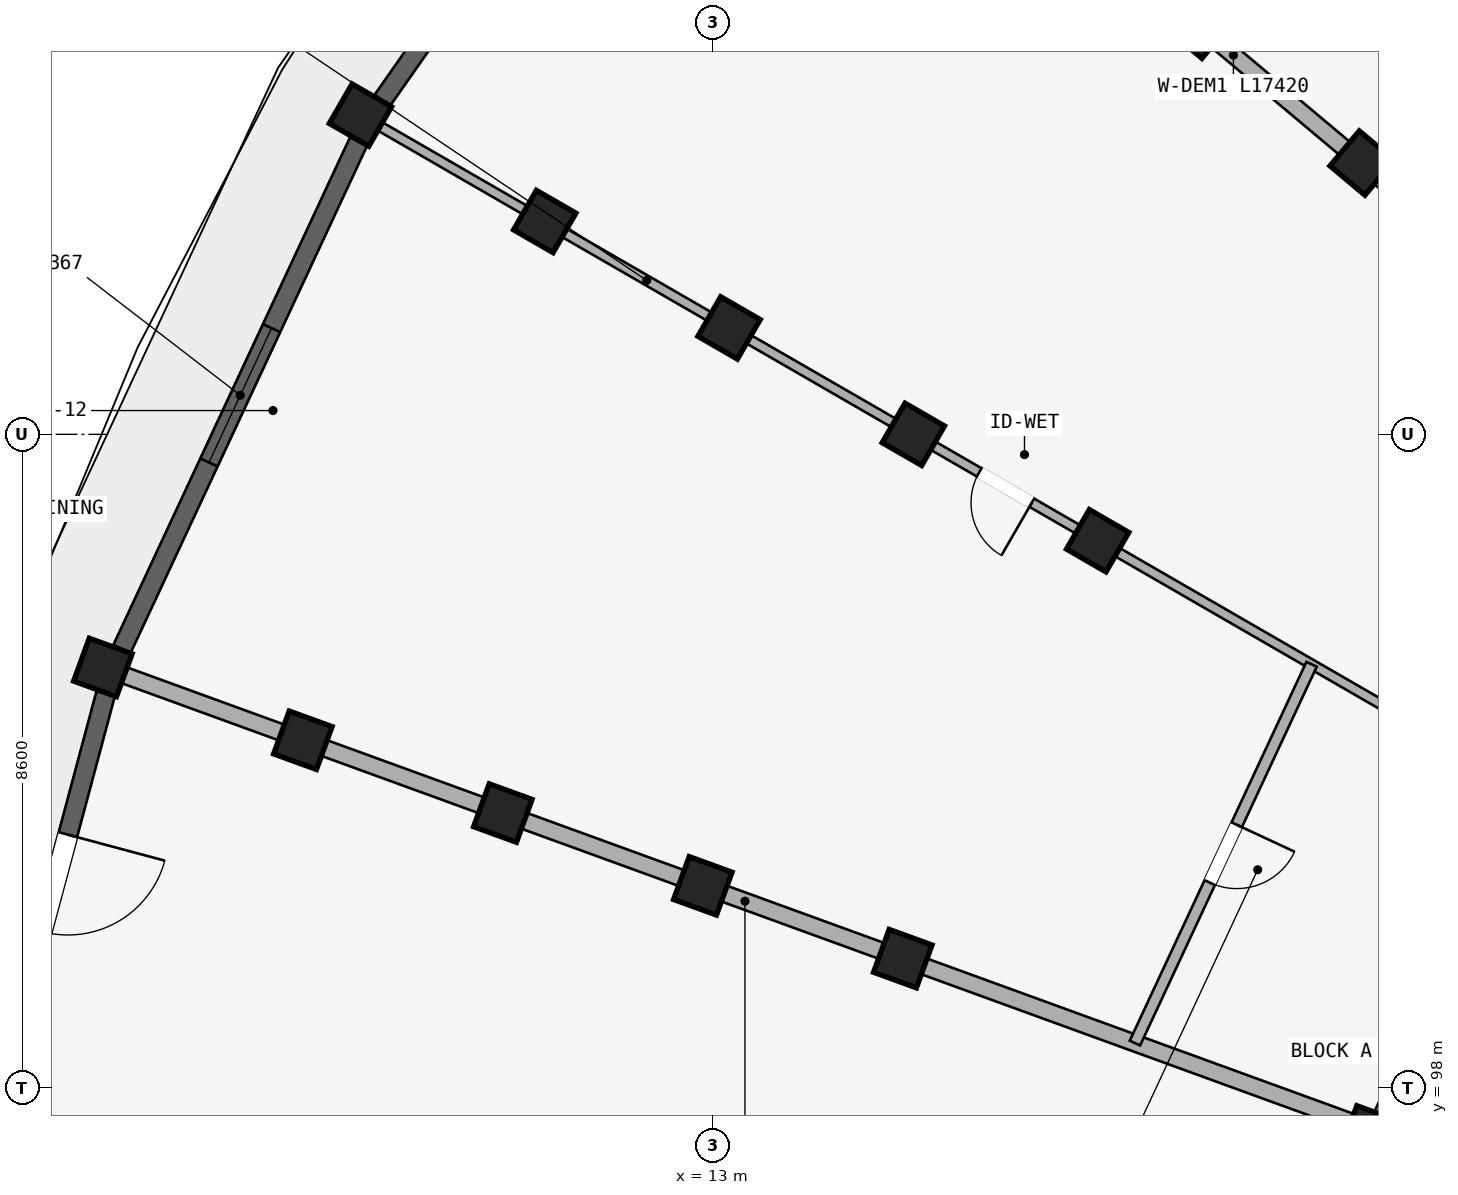
"""IFC4 building model, lengths in metres.
Left out: names, types, materials, properties, quantities, classifications, styles, units other than length and angle.
Written with IfcOpenShell. Run it as: python <this file> out.ifc"""

import sys

from ifc_helpers import new_model, si_unit, direction, frame, frame_2d, origin, origin_2d, place, context, subcontext, project, spatial, rectangle, extrude, element, fill, save


model = new_model("IFC4")
c1 = context("Model", 3, precision=1e-05, world=origin(), true_north=direction((0.0, 1.0)))
c2 = subcontext(c1, "Body", "Model", "MODEL_VIEW")
j1 = project(units=[si_unit("LENGTHUNIT", "METRE"), si_unit("PLANEANGLEUNIT", "RADIAN")], contexts=[c1])
p1 = place(None, origin())
s1 = spatial("IfcSite", under=j1, at=p1, CompositionType="ELEMENT")
p2 = place(p1, origin())
s2 = spatial("IfcBuilding", under=s1, at=p2, CompositionType="ELEMENT")
p3 = place(p2, frame((0.0, 0.0, 33.9)))
s3 = spatial("IfcBuildingStorey", under=s2, at=p3, CompositionType="ELEMENT", Elevation=33.9)
for number, where, z_axis, x_axis in (
    (1, (21.542, 110.169, 0.0), (0.0, 0.0, 1.0), (0.643, 0.766, 0.0)),
    (2, (19.397, 111.969, 0.0), (0.0, 0.0, 1.0), (0.643, 0.766, 0.0)),
    (3, (18.062, 105.2, 0.0), (0.0, 0.0, 1.0), (0.5, 0.866, 0.0)),
    (4, (15.637, 106.6, 0.0), (0.0, 0.0, 1.0), (0.5, 0.866, 0.0)),
    (5, (13.213, 108.0, 0.0), (0.0, 0.0, 1.0), (0.5, 0.866, 0.0)),
    (6, (10.788, 109.4, 0.0), (0.0, 0.0, 1.0), (0.5, 0.866, 0.0)),
    (7, (8.363, 110.8, 0.0), (0.0, 0.0, 1.0), (0.5, 0.866, 0.0)),
):
    element("IfcColumn", number, at=place(p3, frame(where, z_axis=z_axis, x_axis=x_axis)), inside=s3, PredefinedType="COLUMN", context=c2, shape_type="SweptSolid", body=[
        extrude(rectangle(XDim=0.6, YDim=0.6, at=origin_2d()), origin(), (0.0, 0.0, 1.0), 2.93),
    ])
p4 = place(p3, frame((21.701, 97.445, 0.0), z_axis=(0.0, 0.0, 1.0), x_axis=(0.342020143326, 0.939692620786, 0.0)))
e8 = element("IfcColumn", 8, at=p4, inside=s3, PredefinedType="COLUMN", context=c2, shape_type="SweptSolid", body=[
    extrude(rectangle(XDim=0.45, YDim=0.65, at=origin_2d()), origin(), (0.0, 0.0, 1.0), 2.93),
])
for number, where, z_axis, x_axis in (
    (9, (15.499, 99.702, 0.0), (0.0, 0.0, 1.0), (0.342, 0.94, 0.0)),
    (10, (12.868, 100.66, 0.0), (0.0, 0.0, 1.0), (0.342, 0.94, 0.0)),
    (11, (10.236, 101.618, 0.0), (0.0, 0.0, 1.0), (0.342, 0.94, 0.0)),
    (12, (7.605, 102.575, 0.0), (0.0, 0.0, 1.0), (0.342, 0.94, 0.0)),
    (13, (4.974, 103.533, 0.0), (0.0, 0.0, 1.0), (0.342, 0.94, 0.0)),
):
    element("IfcColumn", number, at=place(p3, frame(where, z_axis=z_axis, x_axis=x_axis)), inside=s3, PredefinedType="COLUMN", context=c2, shape_type="SweptSolid", body=[
        extrude(rectangle(XDim=0.6, YDim=0.6, at=origin_2d()), origin(), (0.0, 0.0, 1.0), 2.93),
    ])
p5 = place(p3, frame((23.778, 101.9, 0.0), z_axis=(0.0, 0.0, 1.0), x_axis=(-0.422629854778, -0.906302381024, 0.0)))
e14 = element("IfcWall", 14, at=p5, inside=s3, PredefinedType="STANDARD", context=c2, shape_type="SweptSolid", body=[
    extrude(rectangle(XDim=4.915, YDim=0.2, at=frame_2d((2.458, 0.0))), origin(), (0.0, 0.0, 1.0), 2.372),
])
p6 = place(p3, frame((30.009, 109.479, 0.0), z_axis=(0.0, 0.0, 1.0), x_axis=(-0.642784757967, 0.766046835987, 0.0)))
e15 = element("IfcWall", 15, at=p6, inside=s3, PredefinedType="PARTITIONING", context=c2, shape_type="SweptSolid", body=[
    extrude(rectangle(XDim=17.42, YDim=0.125, at=frame_2d((8.71, 0.0))), origin(), (0.0, 0.0, 1.0), 2.372),
])
p7 = place(p6, frame((7.5, 0.0, 0.0)))
e16 = element("IfcOpeningElement", 16, at=p7, cuts=e15, PredefinedType="OPENING", context=c2, shape_type="SweptSolid", body=[
    extrude(rectangle(XDim=0.8, YDim=2.1, at=frame_2d((0.4, 1.05))), frame((0.0, 0.073, 0.0), z_axis=(0.0, -1.0, 0.0), x_axis=(1.0, 0.0, 0.0)), (0.0, 0.0, 1.0), 0.145),
])
p8 = place(p3, frame((26.521, 105.991, 0.0), z_axis=(0.0, 0.0, 1.0), x_axis=(-0.766046835987, 0.642784757967, 0.0)))
e17 = element("IfcWall", 17, at=p8, inside=s3, PredefinedType="STANDARD", context=c2, shape_type="SweptSolid", body=[
    extrude(rectangle(XDim=17.42, YDim=0.22, at=frame_2d((8.71, 0.0))), origin(), (0.0, 0.0, 1.0), 2.372),
])
p9 = place(p3, frame((23.691, 101.95, 0.0), z_axis=(0.0, 0.0, 1.0), x_axis=(-0.866026648973, 0.499997843263, 0.0)))
e18 = element("IfcWall", 18, at=p9, inside=s3, PredefinedType="PARTITIONING", context=c2, shape_type="SweptSolid", body=[
    extrude(rectangle(XDim=17.42, YDim=0.125, at=frame_2d((8.71, 0.0))), origin(), (0.0, 0.0, 1.0), 2.372),
])
p10 = place(p9, frame((7.5, 0.0, 0.0)))
e19 = element("IfcOpeningElement", 19, at=p10, cuts=e18, PredefinedType="OPENING", context=c2, shape_type="SweptSolid", body=[
    extrude(rectangle(XDim=0.8, YDim=2.1, at=frame_2d((0.4, 1.05))), frame((0.0, 0.073, 0.0), z_axis=(0.0, -1.0, 0.0), x_axis=(1.0, 0.0, 0.0)), (0.0, 0.0, 1.0), 0.145),
])
p11 = place(p3, frame((21.607, 97.479, 0.0), z_axis=(0.0, 0.0, 1.0), x_axis=(-0.939691901159, 0.342022120477, 0.0)))
e20 = element("IfcWall", 20, at=p11, inside=s3, PredefinedType="STANDARD", context=c2, shape_type="SweptSolid", body=[
    extrude(rectangle(XDim=17.42, YDim=0.22, at=frame_2d((8.71, 0.0))), origin(), (0.0, 0.0, 1.0), 2.372),
])
p12 = place(p3, frame((20.877, 103.575, 0.0), z_axis=(0.0, 0.0, 1.0), x_axis=(-0.422630264446, -0.906302189986, 0.0)))
e21 = element("IfcWall", 21, at=p12, inside=s3, PredefinedType="PLUMBINGWALL", context=c2, shape_type="SweptSolid", body=[
    extrude(rectangle(XDim=5.5, YDim=0.15, at=frame_2d((2.75, 0.0))), origin(), (0.0, 0.0, 1.0), 2.372),
])
p13 = place(p12, frame((2.33, 0.0, 0.0)))
e22 = element("IfcOpeningElement", 22, at=p13, cuts=e21, PredefinedType="OPENING", context=c2, shape_type="SweptSolid", body=[
    extrude(rectangle(XDim=0.84, YDim=2.1, at=frame_2d((0.42, 1.05))), frame((0.0, 0.085, 0.0), z_axis=(0.0, -1.0, 0.0), x_axis=(1.0, 0.0, 0.0)), (0.0, 0.0, 1.0), 0.17),
])
p14 = place(p3, frame((12.878, 117.03, 0.0), z_axis=(0.0, 0.0, 1.0), x_axis=(-0.573582441919, -0.819147839112, 0.0)))
e23 = element("IfcWall", 23, at=p14, inside=s3, PredefinedType="STANDARD", context=c2, shape_type="SweptSolid", body=[
    extrude(rectangle(XDim=7.367, YDim=0.25, at=frame_2d((3.684, 0.0))), origin(), (0.0, 0.0, 1.0), 2.472),
])
p15 = place(p14, frame((2.634, 0.0, 0.472)))
e24 = element("IfcOpeningElement", 24, at=p15, cuts=e23, PredefinedType="OPENING", context=c2, shape_type="SweptSolid", body=[
    extrude(rectangle(XDim=2.1, YDim=1.8, at=frame_2d((1.05, 0.9))), frame((0.0, 0.135, 0.0), z_axis=(0.0, -1.0, 0.0), x_axis=(1.0, 0.0, 0.0)), (0.0, 0.0, 1.0), 0.27),
])
p16 = place(p3, frame((8.338, 110.452, 0.0), z_axis=(0.0, 0.0, 1.0), x_axis=(-0.422589730823, -0.906321090675, 0.0)))
e25 = element("IfcWall", 25, at=p16, inside=s3, PredefinedType="STANDARD", context=c2, shape_type="SweptSolid", body=[
    extrude(rectangle(XDim=7.367, YDim=0.25, at=frame_2d((3.684, 0.0))), origin(), (0.0, 0.0, 1.0), 2.472),
])
p17 = place(p16, frame((2.708, 0.0, 0.422)))
e26 = element("IfcOpeningElement", 26, at=p17, cuts=e25, PredefinedType="OPENING", context=c2, shape_type="SweptSolid", body=[
    extrude(rectangle(XDim=1.95, YDim=1.85, at=frame_2d((0.975, 0.925))), frame((0.0, 0.135, 0.0), z_axis=(0.0, -1.0, 0.0), x_axis=(1.0, 0.0, 0.0)), (0.0, 0.0, 1.0), 0.27),
])
p18 = place(p3, frame((5.01, 103.186, 0.0), z_axis=(0.0, 0.0, 1.0), x_axis=(-0.258821669831, -0.965925122991, 0.0)))
e27 = element("IfcWall", 27, at=p18, inside=s3, PredefinedType="STANDARD", context=c2, shape_type="SweptSolid", body=[
    extrude(rectangle(XDim=7.367, YDim=0.25, at=frame_2d((3.684, 0.0))), origin(), (0.0, 0.0, 1.0), 2.472),
])
p19 = place(p18, frame((4.84, 0.0, 0.622)))
e28 = element("IfcOpeningElement", 28, at=p19, cuts=e27, PredefinedType="OPENING", context=c2, shape_type="SweptSolid", body=[
    extrude(rectangle(XDim=1.2, YDim=1.5, at=frame_2d((0.6, 0.75))), frame((0.0, 0.135, 0.0), z_axis=(0.0, -1.0, 0.0), x_axis=(1.0, 0.0, 0.0)), (0.0, 0.0, 1.0), 0.27),
])
p20 = place(p18, frame((1.918, 0.0, 0.0)))
e29 = element("IfcOpeningElement", 29, at=p20, cuts=e27, PredefinedType="OPENING", context=c2, shape_type="SweptSolid", body=[
    extrude(rectangle(XDim=1.32, YDim=2.15, at=frame_2d((0.66, 1.075))), frame((0.0, 0.135, 0.0), z_axis=(0.0, -1.0, 0.0), x_axis=(1.0, 0.0, 0.0)), (0.0, 0.0, 1.0), 0.27),
])
p21 = place(p17, origin())
e30 = element("IfcWindow", 30, at=p21, inside=s3, PartitioningType="DOUBLE_PANEL_VERTICAL", PredefinedType="WINDOW", context=c2, shape_type="SweptSolid", body=[
    extrude(rectangle(XDim=1.95, YDim=1.85, at=frame_2d((0.975, 0.925))), frame((0.0, 0.03, 0.0), z_axis=(0.0, -1.0, 0.0), x_axis=(1.0, 0.0, 0.0)), (0.0, 0.0, 1.0), 0.06),
])
fill(e26, e30)
p22 = place(p10, origin())
e31 = element("IfcDoor", 31, at=p22, inside=s3, OperationType="SINGLE_SWING_LEFT", PredefinedType="DOOR", context=c2, shape_type="SweptSolid", body=[
    extrude(rectangle(XDim=0.8, YDim=2.1, at=frame_2d((0.4, 1.05))), frame((0.0, 0.025, 0.0), z_axis=(0.0, -1.0, 0.0), x_axis=(1.0, 0.0, 0.0)), (0.0, 0.0, 1.0), 0.05),
])
fill(e19, e31)
p23 = place(p13, frame((0.84, 0.0, 0.0), z_axis=(0.0, 0.0, 1.0), x_axis=(-1.0, 0.0, 0.0)))
e32 = element("IfcDoor", 32, at=p23, inside=s3, OperationType="SINGLE_SWING_RIGHT", PredefinedType="DOOR", context=c2, shape_type="SweptSolid", body=[
    extrude(rectangle(XDim=0.84, YDim=2.1, at=frame_2d((0.42, 1.05))), frame((0.0, 0.025, 0.0), z_axis=(0.0, -1.0, 0.0), x_axis=(1.0, 0.0, 0.0)), (0.0, 0.0, 1.0), 0.05),
])
fill(e22, e32)
p24 = place(p20, frame((1.32, 0.0, 0.0), z_axis=(0.0, 0.0, 1.0), x_axis=(-1.0, 0.0, 0.0)))
e33 = element("IfcDoor", 33, at=p24, inside=s3, OperationType="SINGLE_SWING_RIGHT", PredefinedType="DOOR", context=c2, shape_type="SweptSolid", body=[
    extrude(rectangle(XDim=1.32, YDim=2.15, at=frame_2d((0.66, 1.075))), frame((0.0, 0.025, 0.0), z_axis=(0.0, -1.0, 0.0), x_axis=(1.0, 0.0, 0.0)), (0.0, 0.0, 1.0), 0.05),
])
fill(e29, e33)
save(model, sys.argv[1])
